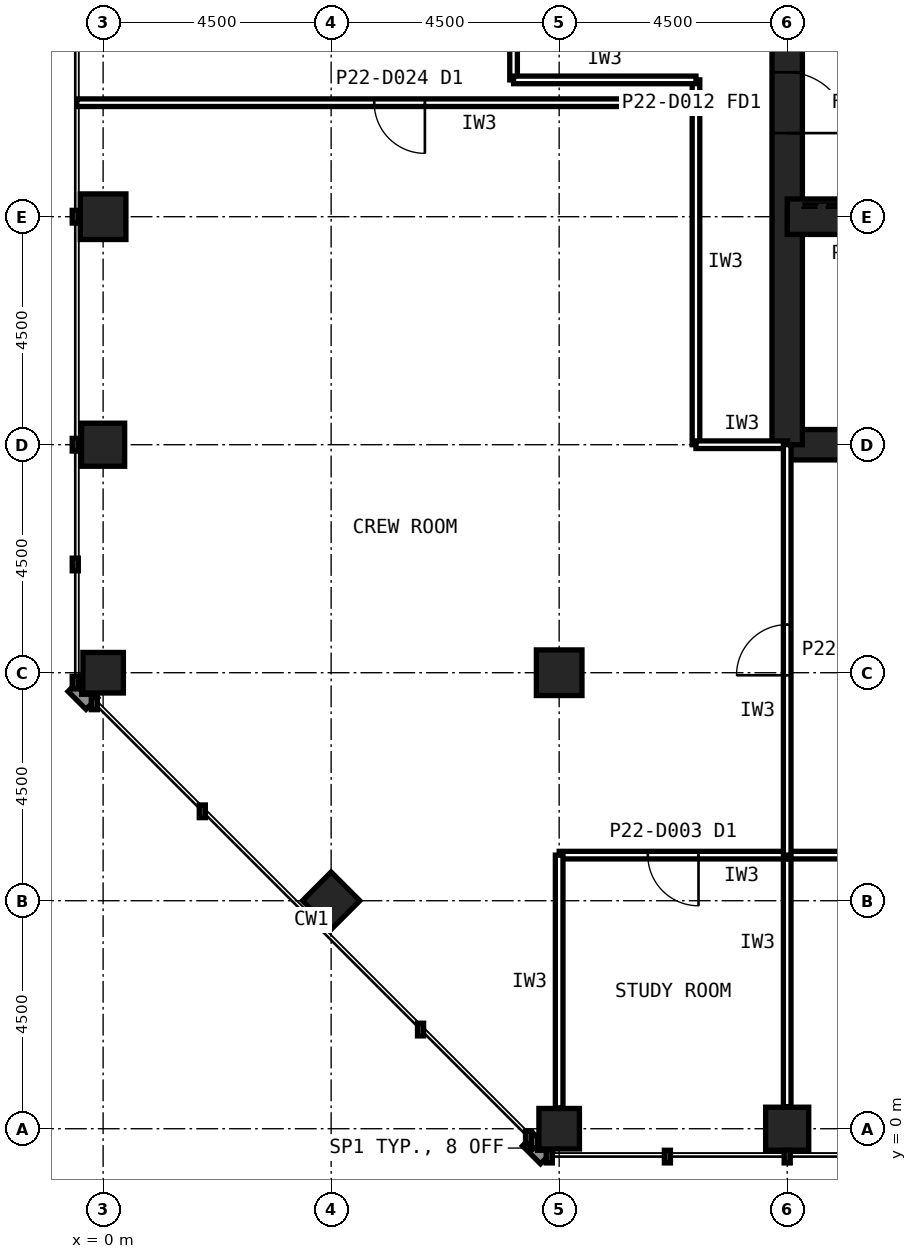
"""IFC4 building model, lengths in metres.
Left out: names, types, materials, properties, quantities, classifications, styles, units other than length and angle.
Written with IfcOpenShell. Run it as: python <this file> out.ifc"""

import sys

from ifc_helpers import new_model, si_unit, direction, frame, frame_2d, origin, origin_2d, place, context, subcontext, project, spatial, rectangle, hollow_rectangle, extrude, element, fill, save


model = new_model("IFC4")
c1 = context("Model", 3, precision=1e-05, world=origin(), true_north=direction((0.0, 1.0)))
c2 = subcontext(c1, "Body", "Model", "MODEL_VIEW")
j1 = project(units=[si_unit("LENGTHUNIT", "METRE"), si_unit("PLANEANGLEUNIT", "RADIAN")], contexts=[c1])
p1 = place(None, origin())
s1 = spatial("IfcSite", under=j1, at=p1, CompositionType="ELEMENT")
p2 = place(p1, origin())
s2 = spatial("IfcBuilding", under=s1, at=p2, CompositionType="ELEMENT")
p3 = place(p2, frame((0.0, 0.0, 96.2)))
s3 = spatial("IfcBuildingStorey", under=s2, at=p3, CompositionType="ELEMENT", Elevation=96.2)
p4 = place(p3, frame((9.0, 0.0, 0.0), z_axis=(0.0, 0.0, 1.0), x_axis=(1.0, 0.0, 0.0)))
e1 = element("IfcColumn", 1, at=p4, inside=s3, PredefinedType="COLUMN", context=c2, shape_type="SweptSolid", body=[
    extrude(hollow_rectangle(XDim=0.8, YDim=0.8, WallThickness=0.045, at=origin_2d()), origin(), (0.0, 0.0, 1.0), 4.2),
])
p5 = place(p3, frame((13.5, 0.0, 0.0), z_axis=(0.0, 0.0, 1.0), x_axis=(1.0, 0.0, 0.0)))
e2 = element("IfcColumn", 2, at=p5, inside=s3, PredefinedType="COLUMN", context=c2, shape_type="SweptSolid", body=[
    extrude(hollow_rectangle(XDim=0.85, YDim=0.85, WallThickness=0.05, at=origin_2d()), origin(), (0.0, 0.0, 1.0), 4.2),
])
p6 = place(p3, frame((0.0, 18.0, 0.0), z_axis=(0.0, 0.0, 1.0), x_axis=(1.0, 0.0, 0.0)))
e3 = element("IfcColumn", 3, at=p6, inside=s3, PredefinedType="COLUMN", context=c2, shape_type="SweptSolid", body=[
    extrude(hollow_rectangle(XDim=0.9, YDim=0.9, WallThickness=0.063, at=origin_2d()), origin(), (0.0, 0.0, 1.0), 4.2),
])
p7 = place(p3, frame((0.0, 13.5, 0.0), z_axis=(0.0, 0.0, 1.0), x_axis=(1.0, 0.0, 0.0)))
e4 = element("IfcColumn", 4, at=p7, inside=s3, PredefinedType="COLUMN", context=c2, shape_type="SweptSolid", body=[
    extrude(hollow_rectangle(XDim=0.85, YDim=0.85, WallThickness=0.05, at=origin_2d()), origin(), (0.0, 0.0, 1.0), 4.2),
])
for number, where, z_axis, x_axis in (
    (5, (0.0, 9.0, 0.0), (0.0, 0.0, 1.0), (1.0, 0.0, 0.0)),
    (6, (4.5, 4.5, 0.0), (0.0, 0.0, 1.0), (0.707, 0.707, 0.0)),
):
    element("IfcColumn", number, at=place(p3, frame(where, z_axis=z_axis, x_axis=x_axis)), inside=s3, PredefinedType="COLUMN", context=c2, shape_type="SweptSolid", body=[
        extrude(hollow_rectangle(XDim=0.8, YDim=0.8, WallThickness=0.045, at=origin_2d()), origin(), (0.0, 0.0, 1.0), 4.2),
    ])
p8 = place(p3, frame((9.0, 9.0, 0.0), z_axis=(0.0, 0.0, 1.0), x_axis=(1.0, 0.0, 0.0)))
e7 = element("IfcColumn", 7, at=p8, inside=s3, PredefinedType="COLUMN", context=c2, shape_type="SweptSolid", body=[
    extrude(hollow_rectangle(XDim=0.9, YDim=0.9, WallThickness=0.063, at=origin_2d()), origin(), (0.0, 0.0, 1.0), 4.2),
])
p9 = place(p3, frame((13.5, 13.5, 0.0), z_axis=(0.0, 0.0, 1.0), x_axis=(1.0, 0.0, 0.0)))
e8 = element("IfcWall", 8, at=p9, inside=s3, PredefinedType="SHEAR", context=c2, shape_type="SweptSolid", body=[
    extrude(rectangle(XDim=27.0, YDim=0.6, at=frame_2d((13.5, 0.0))), origin(), (0.0, 0.0, 1.0), 4.2),
])
p10 = place(p3, frame((13.5, 40.5, 0.0), z_axis=(0.0, 0.0, 1.0), x_axis=(0.0, -1.0, 0.0)))
e9 = element("IfcWall", 9, at=p10, inside=s3, PredefinedType="SHEAR", context=c2, shape_type="SweptSolid", body=[
    extrude(rectangle(XDim=27.0, YDim=0.6, at=frame_2d((13.5, 0.0))), origin(), (0.0, 0.0, 1.0), 4.2),
])
p11 = place(p10, frame((19.65, 0.0, 0.0)))
e10 = element("IfcOpeningElement", 10, at=p11, cuts=e9, PredefinedType="OPENING", context=c2, shape_type="SweptSolid", body=[
    extrude(rectangle(XDim=1.2, YDim=2.1, at=frame_2d((0.6, 1.05))), frame((0.0, 0.31, 0.0), z_axis=(0.0, -1.0, 0.0), x_axis=(1.0, 0.0, 0.0)), (0.0, 0.0, 1.0), 0.62),
])
p12 = place(p10, frame((5.85, 0.0, 0.0)))
e11 = element("IfcOpeningElement", 11, at=p12, cuts=e9, PredefinedType="OPENING", context=c2, shape_type="SweptSolid", body=[
    extrude(rectangle(XDim=1.8, YDim=2.1, at=frame_2d((0.9, 1.05))), frame((0.0, 0.31, 0.0), z_axis=(0.0, -1.0, 0.0), x_axis=(1.0, 0.0, 0.0)), (0.0, 0.0, 1.0), 0.62),
])
p13 = place(p3, frame((13.5, 18.0, 0.0), z_axis=(0.0, 0.0, 1.0), x_axis=(1.0, 0.0, 0.0)))
e12 = element("IfcWall", 12, at=p13, inside=s3, PredefinedType="SHEAR", context=c2, shape_type="SweptSolid", body=[
    extrude(rectangle(XDim=27.0, YDim=0.7, at=frame_2d((13.5, 0.0))), origin(), (0.0, 0.0, 1.0), 4.2),
])
p14 = place(p13, frame((24.3, 0.0, 0.0)))
e13 = element("IfcOpeningElement", 13, at=p14, cuts=e12, PredefinedType="OPENING", context=c2, shape_type="SweptSolid", body=[
    extrude(rectangle(XDim=0.9, YDim=2.1, at=frame_2d((0.45, 1.05))), frame((0.0, 0.36, 0.0), z_axis=(0.0, -1.0, 0.0), x_axis=(1.0, 0.0, 0.0)), (0.0, 0.0, 1.0), 0.72),
])
p15 = place(p13, frame((5.45, 0.0, 0.0)))
e14 = element("IfcOpeningElement", 14, at=p15, cuts=e12, PredefinedType="OPENING", context=c2, shape_type="SweptSolid", body=[
    extrude(rectangle(XDim=1.1, YDim=2.1, at=frame_2d((0.55, 1.05))), frame((0.0, 0.36, 0.0), z_axis=(0.0, -1.0, 0.0), x_axis=(1.0, 0.0, 0.0)), (0.0, 0.0, 1.0), 0.72),
])
p16 = place(p13, frame((8.45, 0.0, 0.0)))
e15 = element("IfcOpeningElement", 15, at=p16, cuts=e12, PredefinedType="OPENING", context=c2, shape_type="SweptSolid", body=[
    extrude(rectangle(XDim=1.1, YDim=2.1, at=frame_2d((0.55, 1.05))), frame((0.0, 0.36, 0.0), z_axis=(0.0, -1.0, 0.0), x_axis=(1.0, 0.0, 0.0)), (0.0, 0.0, 1.0), 0.72),
])
p17 = place(p13, frame((11.45, 0.0, 0.0)))
e16 = element("IfcOpeningElement", 16, at=p17, cuts=e12, PredefinedType="OPENING", context=c2, shape_type="SweptSolid", body=[
    extrude(rectangle(XDim=1.1, YDim=2.1, at=frame_2d((0.55, 1.05))), frame((0.0, 0.36, 0.0), z_axis=(0.0, -1.0, 0.0), x_axis=(1.0, 0.0, 0.0)), (0.0, 0.0, 1.0), 0.72),
])
p18 = place(p13, frame((14.45, 0.0, 0.0)))
e17 = element("IfcOpeningElement", 17, at=p18, cuts=e12, PredefinedType="OPENING", context=c2, shape_type="SweptSolid", body=[
    extrude(rectangle(XDim=1.1, YDim=2.1, at=frame_2d((0.55, 1.05))), frame((0.0, 0.36, 0.0), z_axis=(0.0, -1.0, 0.0), x_axis=(1.0, 0.0, 0.0)), (0.0, 0.0, 1.0), 0.72),
])
p19 = place(p13, frame((17.45, 0.0, 0.0)))
e18 = element("IfcOpeningElement", 18, at=p19, cuts=e12, PredefinedType="OPENING", context=c2, shape_type="SweptSolid", body=[
    extrude(rectangle(XDim=1.1, YDim=2.1, at=frame_2d((0.55, 1.05))), frame((0.0, 0.36, 0.0), z_axis=(0.0, -1.0, 0.0), x_axis=(1.0, 0.0, 0.0)), (0.0, 0.0, 1.0), 0.72),
])
p20 = place(p13, frame((20.45, 0.0, 0.0)))
e19 = element("IfcOpeningElement", 19, at=p20, cuts=e12, PredefinedType="OPENING", context=c2, shape_type="SweptSolid", body=[
    extrude(rectangle(XDim=1.1, YDim=2.1, at=frame_2d((0.55, 1.05))), frame((0.0, 0.36, 0.0), z_axis=(0.0, -1.0, 0.0), x_axis=(1.0, 0.0, 0.0)), (0.0, 0.0, 1.0), 0.72),
])
p21 = place(p13, frame((1.6, 0.0, 0.0)))
e20 = element("IfcOpeningElement", 20, at=p21, cuts=e12, PredefinedType="OPENING", context=c2, shape_type="SweptSolid", body=[
    extrude(rectangle(XDim=1.3, YDim=2.2, at=frame_2d((0.65, 1.1))), frame((0.0, 0.36, 0.0), z_axis=(0.0, -1.0, 0.0), x_axis=(1.0, 0.0, 0.0)), (0.0, 0.0, 1.0), 0.72),
])
p22 = place(p3, frame((8.1, 33.3, 0.0), z_axis=(0.0, 0.0, 1.0), x_axis=(0.0, -1.0, 0.0)))
e21 = element("IfcWall", 21, at=p22, inside=s3, PredefinedType="PARTITIONING", context=c2, shape_type="SweptSolid", body=[
    extrude(rectangle(XDim=12.6, YDim=0.15, at=frame_2d((6.3, 0.0))), origin(), (0.0, 0.0, 1.0), 4.04),
])
p23 = place(p22, frame((5.8, 0.0, 0.0)))
e22 = element("IfcOpeningElement", 22, at=p23, cuts=e21, PredefinedType="OPENING", context=c2, shape_type="SweptSolid", body=[
    extrude(rectangle(XDim=1.0, YDim=2.1, at=frame_2d((0.5, 1.05))), frame((0.0, 0.085, 0.0), z_axis=(0.0, -1.0, 0.0), x_axis=(1.0, 0.0, 0.0)), (0.0, 0.0, 1.0), 0.17),
])
p24 = place(p3, frame((11.7, 20.7, 0.0), z_axis=(0.0, 0.0, 1.0), x_axis=(0.0, -1.0, 0.0)))
e23 = element("IfcWall", 23, at=p24, inside=s3, PredefinedType="PARTITIONING", context=c2, shape_type="SweptSolid", body=[
    extrude(rectangle(XDim=7.2, YDim=0.15, at=frame_2d((3.6, 0.0))), origin(), (0.0, 0.0, 1.0), 4.04),
])
p25 = place(p3, frame((8.1, 20.7, 0.0), z_axis=(0.0, 0.0, 1.0), x_axis=(1.0, 0.0, 0.0)))
e24 = element("IfcWall", 24, at=p25, inside=s3, PredefinedType="PARTITIONING", context=c2, shape_type="SweptSolid", body=[
    extrude(rectangle(XDim=3.6, YDim=0.15, at=frame_2d((1.8, 0.0))), origin(), (0.0, 0.0, 1.0), 4.04),
])
p26 = place(p3, frame((11.7, 13.5, 0.0), z_axis=(0.0, 0.0, 1.0), x_axis=(1.0, 0.0, 0.0)))
e25 = element("IfcWall", 25, at=p26, inside=s3, PredefinedType="PARTITIONING", context=c2, shape_type="SweptSolid", body=[
    extrude(rectangle(XDim=1.81, YDim=0.15, at=frame_2d((0.905, 0.0))), origin(), (0.0, 0.0, 1.0), 3.189),
])
p27 = place(p3, frame((13.5, 0.435, 0.0), z_axis=(0.0, 0.0, 1.0), x_axis=(0.0, 1.0, 0.0)))
e26 = element("IfcWall", 26, at=p27, inside=s3, PredefinedType="PARTITIONING", context=c2, shape_type="SweptSolid", body=[
    extrude(rectangle(XDim=4.965, YDim=0.15, at=frame_2d((2.482, 0.0))), origin(), (0.0, 0.0, 1.0), 3.189),
])
p28 = place(p3, frame((13.5, 5.4, 0.0), z_axis=(0.0, 0.0, 1.0), x_axis=(-1.0, 0.0, 0.0)))
e27 = element("IfcWall", 27, at=p28, inside=s3, PredefinedType="PARTITIONING", context=c2, shape_type="SweptSolid", body=[
    extrude(rectangle(XDim=4.5, YDim=0.15, at=frame_2d((2.25, 0.0))), origin(), (0.0, 0.0, 1.0), 4.04),
])
p29 = place(p28, frame((1.75, 0.0, 0.0)))
e28 = element("IfcOpeningElement", 28, at=p29, cuts=e27, PredefinedType="OPENING", context=c2, shape_type="SweptSolid", body=[
    extrude(rectangle(XDim=1.0, YDim=2.1, at=frame_2d((0.5, 1.05))), frame((0.0, 0.085, 0.0), z_axis=(0.0, -1.0, 0.0), x_axis=(1.0, 0.0, 0.0)), (0.0, 0.0, 1.0), 0.17),
])
p30 = place(p3, frame((9.0, 5.4, 0.0), z_axis=(0.0, 0.0, 1.0), x_axis=(0.0, -1.0, 0.0)))
e29 = element("IfcWall", 29, at=p30, inside=s3, PredefinedType="PARTITIONING", context=c2, shape_type="SweptSolid", body=[
    extrude(rectangle(XDim=4.99, YDim=0.15, at=frame_2d((2.495, 0.0))), origin(), (0.0, 0.0, 1.0), 3.429),
])
p31 = place(p3, frame((18.0, 5.4, 0.0), z_axis=(0.0, 0.0, 1.0), x_axis=(-1.0, 0.0, 0.0)))
e30 = element("IfcWall", 30, at=p31, inside=s3, PredefinedType="PARTITIONING", context=c2, shape_type="SweptSolid", body=[
    extrude(rectangle(XDim=4.5, YDim=0.15, at=frame_2d((2.25, 0.0))), origin(), (0.0, 0.0, 1.0), 4.04),
])
p32 = place(p31, frame((1.75, 0.0, 0.0)))
e31 = element("IfcOpeningElement", 31, at=p32, cuts=e30, PredefinedType="OPENING", context=c2, shape_type="SweptSolid", body=[
    extrude(rectangle(XDim=1.0, YDim=2.1, at=frame_2d((0.5, 1.05))), frame((0.0, 0.085, 0.0), z_axis=(0.0, -1.0, 0.0), x_axis=(1.0, 0.0, 0.0)), (0.0, 0.0, 1.0), 0.17),
])
p33 = place(p3, frame((13.5, 5.4, 0.0), z_axis=(0.0, 0.0, 1.0), x_axis=(0.0, 1.0, 0.0)))
e32 = element("IfcWall", 32, at=p33, inside=s3, PredefinedType="PARTITIONING", context=c2, shape_type="SweptSolid", body=[
    extrude(rectangle(XDim=8.1, YDim=0.15, at=frame_2d((4.05, 0.0))), origin(), (0.0, 0.0, 1.0), 3.189),
])
p34 = place(p33, frame((3.55, 0.0, 0.0)))
e33 = element("IfcOpeningElement", 33, at=p34, cuts=e32, PredefinedType="OPENING", context=c2, shape_type="SweptSolid", body=[
    extrude(rectangle(XDim=1.0, YDim=2.1, at=frame_2d((0.5, 1.05))), frame((0.0, 0.085, 0.0), z_axis=(0.0, -1.0, 0.0), x_axis=(1.0, 0.0, 0.0)), (0.0, 0.0, 1.0), 0.17),
])
p35 = place(p3, frame((11.7, 20.25, 0.0), z_axis=(0.0, 0.0, 1.0), x_axis=(-1.0, 0.0, 0.0)))
e34 = element("IfcWall", 34, at=p35, inside=s3, PredefinedType="PARTITIONING", context=c2, shape_type="SweptSolid", body=[
    extrude(rectangle(XDim=12.22, YDim=0.15, at=frame_2d((6.11, 0.0))), origin(), (0.0, 0.0, 1.0), 4.04),
])
p36 = place(p35, frame((5.35, 0.0, 0.0)))
e35 = element("IfcOpeningElement", 35, at=p36, cuts=e34, PredefinedType="OPENING", context=c2, shape_type="SweptSolid", body=[
    extrude(rectangle(XDim=1.0, YDim=2.1, at=frame_2d((0.5, 1.05))), frame((0.0, 0.085, 0.0), z_axis=(0.0, -1.0, 0.0), x_axis=(1.0, 0.0, 0.0)), (0.0, 0.0, 1.0), 0.17),
])
p37 = place(p11, origin())
e36 = element("IfcDoor", 36, at=p37, inside=s3, OperationType="SINGLE_SWING_RIGHT", PredefinedType="DOOR", context=c2, shape_type="SweptSolid", body=[
    extrude(rectangle(XDim=1.2, YDim=2.1, at=frame_2d((0.6, 1.05))), frame((0.0, 0.025, 0.0), z_axis=(0.0, -1.0, 0.0), x_axis=(1.0, 0.0, 0.0)), (0.0, 0.0, 1.0), 0.05),
])
fill(e10, e36)
p38 = place(p29, origin())
e37 = element("IfcDoor", 37, at=p38, inside=s3, OperationType="SINGLE_SWING_LEFT", PredefinedType="DOOR", context=c2, shape_type="SweptSolid", body=[
    extrude(rectangle(XDim=1.0, YDim=2.1, at=frame_2d((0.5, 1.05))), frame((0.0, 0.025, 0.0), z_axis=(0.0, -1.0, 0.0), x_axis=(1.0, 0.0, 0.0)), (0.0, 0.0, 1.0), 0.05),
])
fill(e28, e37)
p39 = place(p34, origin())
e38 = element("IfcDoor", 38, at=p39, inside=s3, OperationType="SINGLE_SWING_LEFT", PredefinedType="DOOR", context=c2, shape_type="SweptSolid", body=[
    extrude(rectangle(XDim=1.0, YDim=2.1, at=frame_2d((0.5, 1.05))), frame((0.0, 0.025, 0.0), z_axis=(0.0, -1.0, 0.0), x_axis=(1.0, 0.0, 0.0)), (0.0, 0.0, 1.0), 0.05),
])
fill(e33, e38)
p40 = place(p36, origin())
e39 = element("IfcDoor", 39, at=p40, inside=s3, OperationType="SINGLE_SWING_LEFT", PredefinedType="DOOR", context=c2, shape_type="SweptSolid", body=[
    extrude(rectangle(XDim=1.0, YDim=2.1, at=frame_2d((0.5, 1.05))), frame((0.0, 0.025, 0.0), z_axis=(0.0, -1.0, 0.0), x_axis=(1.0, 0.0, 0.0)), (0.0, 0.0, 1.0), 0.05),
])
fill(e35, e39)
save(model, sys.argv[1])
